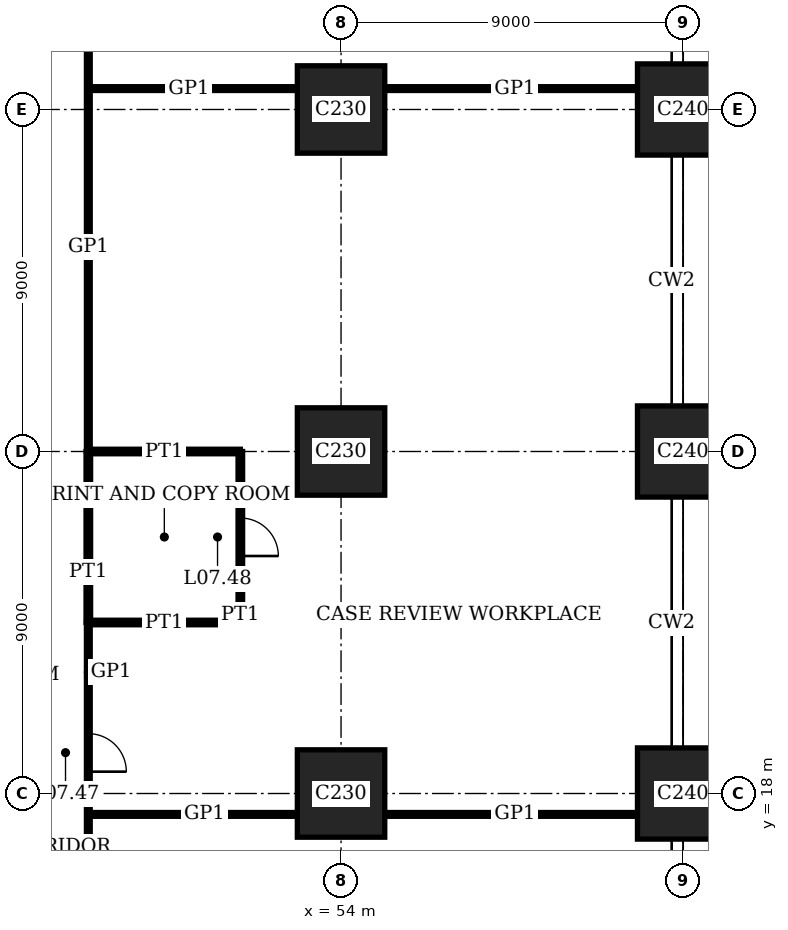
"""IFC4 building model, lengths in metres.
Left out: names, types, materials, properties, quantities, classifications, styles, units other than length and angle.
Written with IfcOpenShell. Run it as: python <this file> out.ifc"""

import sys

from ifc_helpers import new_model, si_unit, direction, frame, frame_2d, origin, origin_2d, place, context, subcontext, project, spatial, rectangle, extrude, element, fill, save


model = new_model("IFC4")
c1 = context("Model", 3, precision=1e-05, world=origin(), true_north=direction((0.0, 1.0)))
c2 = subcontext(c1, "Body", "Model", "MODEL_VIEW")
j1 = project(units=[si_unit("LENGTHUNIT", "METRE"), si_unit("PLANEANGLEUNIT", "RADIAN")], contexts=[c1])
p1 = place(None, origin())
s1 = spatial("IfcSite", under=j1, at=p1, CompositionType="ELEMENT")
p2 = place(p1, origin())
s2 = spatial("IfcBuilding", under=s1, at=p2, CompositionType="ELEMENT")
p3 = place(p2, frame((0.0, 0.0, 31.8)))
s3 = spatial("IfcBuildingStorey", under=s2, at=p3, CompositionType="ELEMENT", Elevation=31.8)
for number, where, z_axis, x_axis in (
    (1, (54.0, 18.0, 0.0), (0.0, 0.0, 1.0), (1.0, 0.0, 0.0)),
    (2, (54.0, 27.0, 0.0), (0.0, 0.0, 1.0), (1.0, 0.0, 0.0)),
    (3, (54.0, 36.0, 0.0), (0.0, 0.0, 1.0), (1.0, 0.0, 0.0)),
):
    element("IfcColumn", number, at=place(p3, frame(where, z_axis=z_axis, x_axis=x_axis)), inside=s3, PredefinedType="COLUMN", context=c2, shape_type="SweptSolid", body=[
        extrude(rectangle(XDim=2.3, YDim=2.3, at=origin_2d()), origin(), (0.0, 0.0, 1.0), 4.0),
    ])
for number, where, z_axis, x_axis in (
    (4, (63.0, 18.0, 0.0), (0.0, 0.0, 1.0), (1.0, 0.0, 0.0)),
    (5, (63.0, 27.0, 0.0), (0.0, 0.0, 1.0), (1.0, 0.0, 0.0)),
    (6, (63.0, 36.0, 0.0), (0.0, 0.0, 1.0), (1.0, 0.0, 0.0)),
):
    element("IfcColumn", number, at=place(p3, frame(where, z_axis=z_axis, x_axis=x_axis)), inside=s3, PredefinedType="COLUMN", context=c2, shape_type="SweptSolid", body=[
        extrude(rectangle(XDim=2.4, YDim=2.4, at=origin_2d()), origin(), (0.0, 0.0, 1.0), 4.0),
    ])
p4 = place(p3, frame((47.35, 17.45, 0.0), z_axis=(0.0, 0.0, 1.0), x_axis=(1.0, 0.0, 0.0)))
e7 = element("IfcWall", 7, at=p4, inside=s3, PredefinedType="PARTITIONING", context=c2, shape_type="SweptSolid", body=[
    extrude(rectangle(XDim=5.5, YDim=0.1, at=frame_2d((2.75, 0.0))), origin(), (0.0, 0.0, 1.0), 3.75),
])
p5 = place(p3, frame((55.15, 17.45, 0.0), z_axis=(0.0, 0.0, 1.0), x_axis=(1.0, 0.0, 0.0)))
e8 = element("IfcWall", 8, at=p5, inside=s3, PredefinedType="PARTITIONING", context=c2, shape_type="SweptSolid", body=[
    extrude(rectangle(XDim=6.65, YDim=0.1, at=frame_2d((3.325, 0.0))), origin(), (0.0, 0.0, 1.0), 3.75),
])
p6 = place(p3, frame((47.35, 22.5, 0.0), z_axis=(0.0, 0.0, 1.0), x_axis=(1.0, 0.0, 0.0)))
e9 = element("IfcWall", 9, at=p6, inside=s3, PredefinedType="PARTITIONING", context=c2, shape_type="SweptSolid", body=[
    extrude(rectangle(XDim=4.0, YDim=0.12, at=frame_2d((2.0, 0.0))), origin(), (0.0, 0.0, 1.0), 3.1),
])
p7 = place(p3, frame((47.35, 27.0, 0.0), z_axis=(0.0, 0.0, 1.0), x_axis=(1.0, 0.0, 0.0)))
e10 = element("IfcWall", 10, at=p7, inside=s3, PredefinedType="PARTITIONING", context=c2, shape_type="SweptSolid", body=[
    extrude(rectangle(XDim=4.0, YDim=0.12, at=frame_2d((2.0, 0.0))), origin(), (0.0, 0.0, 1.0), 3.05),
])
p8 = place(p3, frame((47.35, 36.55, 0.0), z_axis=(0.0, 0.0, 1.0), x_axis=(1.0, 0.0, 0.0)))
e11 = element("IfcWall", 11, at=p8, inside=s3, PredefinedType="PARTITIONING", context=c2, shape_type="SweptSolid", body=[
    extrude(rectangle(XDim=5.5, YDim=0.1, at=frame_2d((2.75, 0.0))), origin(), (0.0, 0.0, 1.0), 3.75),
])
p9 = place(p3, frame((55.15, 36.55, 0.0), z_axis=(0.0, 0.0, 1.0), x_axis=(1.0, 0.0, 0.0)))
e12 = element("IfcWall", 12, at=p9, inside=s3, PredefinedType="PARTITIONING", context=c2, shape_type="SweptSolid", body=[
    extrude(rectangle(XDim=6.65, YDim=0.1, at=frame_2d((3.325, 0.0))), origin(), (0.0, 0.0, 1.0), 3.75),
])
p10 = place(p3, frame((47.35, 22.5, 0.0), z_axis=(0.0, 0.0, 1.0), x_axis=(0.0, 1.0, 0.0)))
e13 = element("IfcWall", 13, at=p10, inside=s3, PredefinedType="PARTITIONING", context=c2, shape_type="SweptSolid", body=[
    extrude(rectangle(XDim=4.5, YDim=0.12, at=frame_2d((2.25, 0.0))), origin(), (0.0, 0.0, 1.0), 3.75),
])
p11 = place(p3, frame((47.35, 15.65, 0.0), z_axis=(0.0, 0.0, 1.0), x_axis=(0.0, 1.0, 0.0)))
e14 = element("IfcWall", 14, at=p11, inside=s3, PredefinedType="PARTITIONING", context=c2, shape_type="SweptSolid", body=[
    extrude(rectangle(XDim=6.85, YDim=0.1, at=frame_2d((3.425, 0.0))), origin(), (0.0, 0.0, 1.0), 3.75),
])
p12 = place(p11, frame((2.925, 0.0, 0.0)))
e15 = element("IfcOpeningElement", 15, at=p12, cuts=e14, PredefinedType="OPENING", context=c2, shape_type="SweptSolid", body=[
    extrude(rectangle(XDim=1.0, YDim=2.4, at=frame_2d((0.5, 1.2))), frame((0.0, 0.06, 0.0), z_axis=(0.0, -1.0, 0.0), x_axis=(1.0, 0.0, 0.0)), (0.0, 0.0, 1.0), 0.12),
])
p13 = place(p3, frame((47.35, 27.0, 0.0), z_axis=(0.0, 0.0, 1.0), x_axis=(0.0, 1.0, 0.0)))
e16 = element("IfcWall", 16, at=p13, inside=s3, PredefinedType="PARTITIONING", context=c2, shape_type="SweptSolid", body=[
    extrude(rectangle(XDim=11.35, YDim=0.1, at=frame_2d((5.675, 0.0))), origin(), (0.0, 0.0, 1.0), 3.75),
])
p14 = place(p3, frame((51.35, 22.5, 0.0), z_axis=(0.0, 0.0, 1.0), x_axis=(0.0, 1.0, 0.0)))
e17 = element("IfcWall", 17, at=p14, inside=s3, PredefinedType="PARTITIONING", context=c2, shape_type="SweptSolid", body=[
    extrude(rectangle(XDim=4.5, YDim=0.12, at=frame_2d((2.25, 0.0))), origin(), (0.0, 0.0, 1.0), 3.75),
])
p15 = place(p14, frame((1.75, 0.0, 0.0)))
e18 = element("IfcOpeningElement", 18, at=p15, cuts=e17, PredefinedType="OPENING", context=c2, shape_type="SweptSolid", body=[
    extrude(rectangle(XDim=1.0, YDim=2.4, at=frame_2d((0.5, 1.2))), frame((0.0, 0.07, 0.0), z_axis=(0.0, -1.0, 0.0), x_axis=(1.0, 0.0, 0.0)), (0.0, 0.0, 1.0), 0.14),
])
p16 = place(p12, origin())
e19 = element("IfcDoor", 19, at=p16, inside=s3, OperationType="SINGLE_SWING_LEFT", PredefinedType="DOOR", context=c2, shape_type="SweptSolid", body=[
    extrude(rectangle(XDim=1.0, YDim=2.4, at=frame_2d((0.5, 1.2))), frame((0.0, 0.02, 0.0), z_axis=(0.0, -1.0, 0.0), x_axis=(1.0, 0.0, 0.0)), (0.0, 0.0, 1.0), 0.04),
])
fill(e15, e19)
p17 = place(p15, origin())
e20 = element("IfcDoor", 20, at=p17, inside=s3, OperationType="SINGLE_SWING_LEFT", PredefinedType="DOOR", context=c2, shape_type="SweptSolid", body=[
    extrude(rectangle(XDim=1.0, YDim=2.4, at=frame_2d((0.5, 1.2))), frame((0.0, 0.025, 0.0), z_axis=(0.0, -1.0, 0.0), x_axis=(1.0, 0.0, 0.0)), (0.0, 0.0, 1.0), 0.05),
])
fill(e18, e20)
save(model, sys.argv[1])
